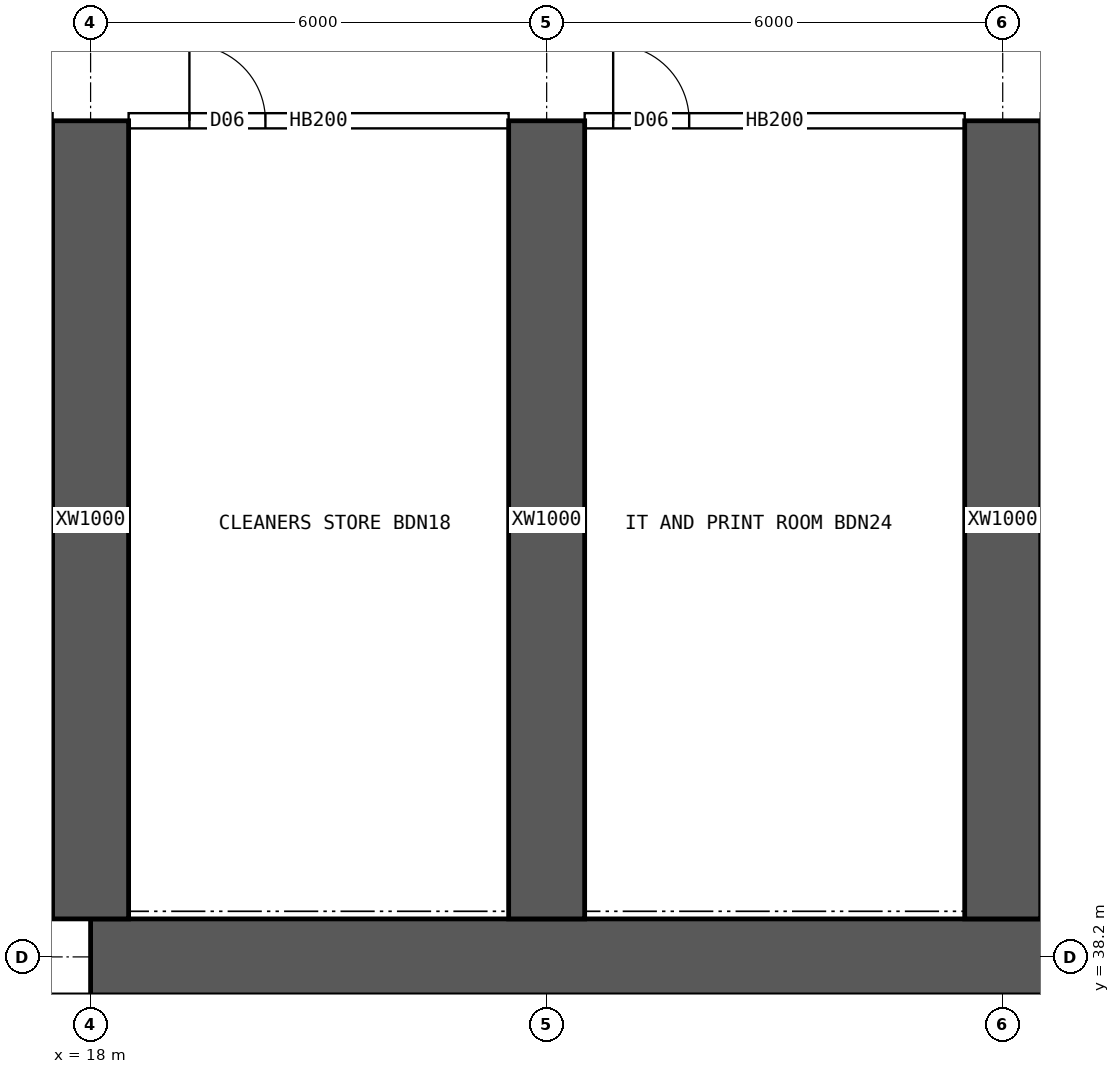
"""IFC4 building model, lengths in metres.
Left out: names, types, materials, properties, quantities, classifications, styles, units other than length and angle.
Written with IfcOpenShell. Run it as: python <this file> out.ifc"""

import sys

from ifc_helpers import new_model, si_unit, direction, frame, frame_2d, origin, place, context, subcontext, project, spatial, rectangle, extrude, element, fill, save


model = new_model("IFC4")
c1 = context("Model", 3, precision=1e-05, world=origin(), true_north=direction((0.0, 1.0)))
c2 = subcontext(c1, "Body", "Model", "MODEL_VIEW")
j1 = project(units=[si_unit("LENGTHUNIT", "METRE"), si_unit("PLANEANGLEUNIT", "RADIAN")], contexts=[c1])
p1 = place(None, origin())
s1 = spatial("IfcSite", under=j1, at=p1, CompositionType="ELEMENT")
p2 = place(p1, origin())
s2 = spatial("IfcBuilding", under=s1, at=p2, CompositionType="ELEMENT")
p3 = place(p2, frame((0.0, 0.0, 35.2)))
s3 = spatial("IfcBuildingStorey", under=s2, at=p3, CompositionType="ELEMENT", Elevation=35.2)
p4 = place(p3, frame((18.0, 38.2, 0.0), z_axis=(0.0, 0.0, 1.0), x_axis=(1.0, 0.0, 0.0)))
e1 = element("IfcWall", 1, at=p4, inside=s3, PredefinedType="SHEAR", context=c2, shape_type="SweptSolid", body=[
    extrude(rectangle(XDim=48.0, YDim=1.0, at=frame_2d((24.0, 0.0))), origin(), (0.0, 0.0, 1.0), 3.75),
])
for number, where, z_axis, x_axis in (
    (2, (21.6, 34.75, 0.0), (0.0, 0.0, 1.0), (0.0, 1.0, 0.0)),
    (3, (26.0, 34.75, 0.0), (0.0, 0.0, 1.0), (0.0, 1.0, 0.0)),
):
    element("IfcWall", number, at=place(p3, frame(where, z_axis=z_axis, x_axis=x_axis)), inside=s3, PredefinedType="SHEAR", context=c2, shape_type="SweptSolid", body=[
        extrude(rectangle(XDim=2.95, YDim=0.3, at=frame_2d((1.475, 0.0))), origin(), (0.0, 0.0, 1.0), 3.75),
    ])
for number, where, z_axis, x_axis in (
    (4, (18.0, 38.7, 0.0), (0.0, 0.0, 1.0), (0.0, 1.0, 0.0)),
    (5, (24.0, 38.7, 0.0), (0.0, 0.0, 1.0), (0.0, 1.0, 0.0)),
    (6, (30.0, 38.7, 0.0), (0.0, 0.0, 1.0), (0.0, 1.0, 0.0)),
):
    element("IfcWall", number, at=place(p3, frame(where, z_axis=z_axis, x_axis=x_axis)), inside=s3, PredefinedType="SHEAR", context=c2, shape_type="SweptSolid", body=[
        extrude(rectangle(XDim=10.5, YDim=1.0, at=frame_2d((5.25, 0.0))), origin(), (0.0, 0.0, 1.0), 3.75),
    ])
p5 = place(p3, frame((29.651, 34.75, 0.0), z_axis=(0.0, 0.0, 1.0), x_axis=(0.0, 1.0, 0.0)))
e7 = element("IfcWall", 7, at=p5, inside=s3, PredefinedType="SOLIDWALL", context=c2, shape_type="SweptSolid", body=[
    extrude(rectangle(XDim=2.95, YDim=0.15, at=frame_2d((1.475, 0.0))), origin(), (0.0, 0.0, 1.0), 3.3),
])
p6 = place(p3, frame((18.5, 49.2, 0.0), z_axis=(0.0, 0.0, 1.0), x_axis=(1.0, 0.0, 0.0)))
e8 = element("IfcWall", 8, at=p6, inside=s3, PredefinedType="SOLIDWALL", context=c2, shape_type="SweptSolid", body=[
    extrude(rectangle(XDim=5.0, YDim=0.2, at=frame_2d((2.5, 0.0))), origin(), (0.0, 0.0, 1.0), 3.3),
])
p7 = place(p6, frame((0.8, 0.0, 0.0)))
e9 = element("IfcOpeningElement", 9, at=p7, cuts=e8, PredefinedType="OPENING", context=c2, shape_type="SweptSolid", body=[
    extrude(rectangle(XDim=1.0, YDim=2.1, at=frame_2d((0.5, 1.05))), frame((0.0, 0.11, 0.0), z_axis=(0.0, -1.0, 0.0), x_axis=(1.0, 0.0, 0.0)), (0.0, 0.0, 1.0), 0.22),
])
p8 = place(p3, frame((24.5, 49.2, 0.0), z_axis=(0.0, 0.0, 1.0), x_axis=(1.0, 0.0, 0.0)))
e10 = element("IfcWall", 10, at=p8, inside=s3, PredefinedType="SOLIDWALL", context=c2, shape_type="SweptSolid", body=[
    extrude(rectangle(XDim=5.0, YDim=0.2, at=frame_2d((2.5, 0.0))), origin(), (0.0, 0.0, 1.0), 3.3),
])
p9 = place(p8, frame((0.375, 0.0, 0.0)))
e11 = element("IfcOpeningElement", 11, at=p9, cuts=e10, PredefinedType="OPENING", context=c2, shape_type="SweptSolid", body=[
    extrude(rectangle(XDim=1.0, YDim=2.1, at=frame_2d((0.5, 1.05))), frame((0.0, 0.11, 0.0), z_axis=(0.0, -1.0, 0.0), x_axis=(1.0, 0.0, 0.0)), (0.0, 0.0, 1.0), 0.22),
])
p10 = place(p7, origin())
e12 = element("IfcDoor", 12, at=p10, inside=s3, OperationType="SINGLE_SWING_LEFT", PredefinedType="DOOR", context=c2, shape_type="SweptSolid", body=[
    extrude(rectangle(XDim=1.0, YDim=2.1, at=frame_2d((0.5, 1.05))), frame((0.0, 0.025, 0.0), z_axis=(0.0, -1.0, 0.0), x_axis=(1.0, 0.0, 0.0)), (0.0, 0.0, 1.0), 0.05),
])
fill(e9, e12)
p11 = place(p9, origin())
e13 = element("IfcDoor", 13, at=p11, inside=s3, OperationType="SINGLE_SWING_LEFT", PredefinedType="DOOR", context=c2, shape_type="SweptSolid", body=[
    extrude(rectangle(XDim=1.0, YDim=2.1, at=frame_2d((0.5, 1.05))), frame((0.0, 0.025, 0.0), z_axis=(0.0, -1.0, 0.0), x_axis=(1.0, 0.0, 0.0)), (0.0, 0.0, 1.0), 0.05),
])
fill(e11, e13)
save(model, sys.argv[1])
